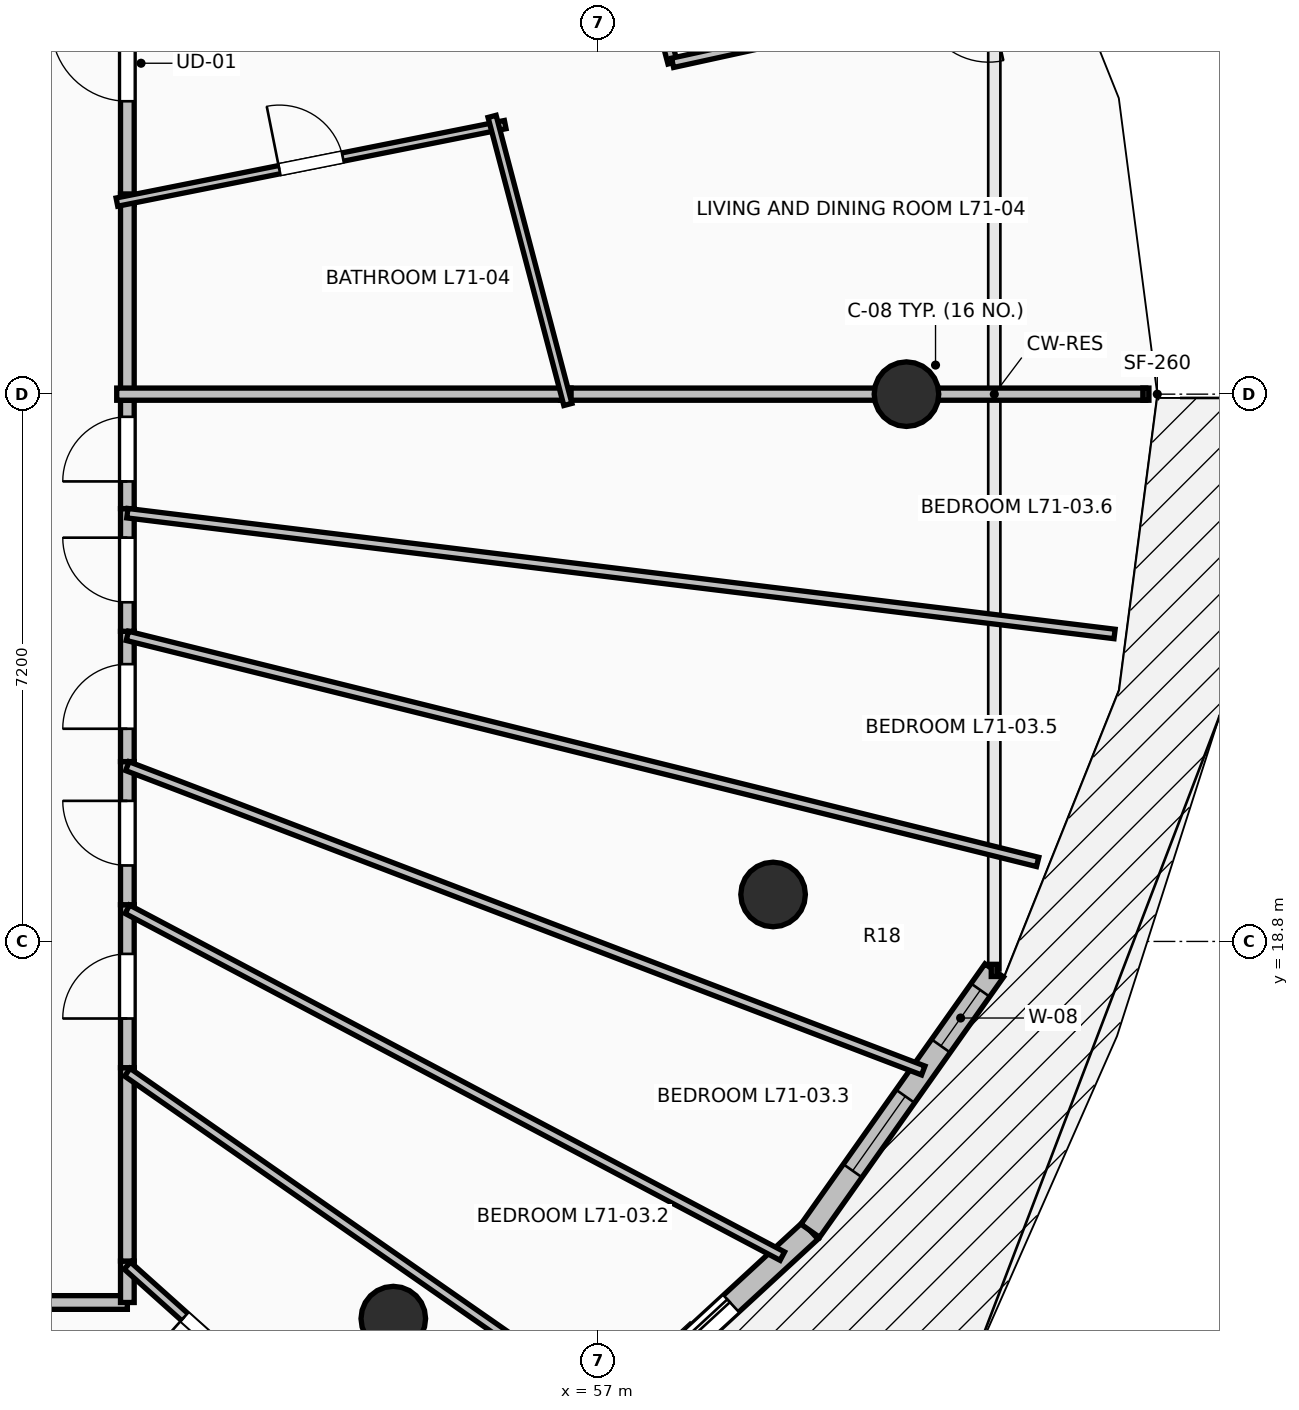
"""IFC4 building model, lengths in metres.
Left out: names, types, materials, properties, quantities, classifications, styles, units other than length and angle.
Written with IfcOpenShell. Run it as: python <this file> out.ifc"""

import sys

from ifc_helpers import new_model, si_unit, direction, frame, frame_2d, origin, origin_2d, place, context, subcontext, project, spatial, rectangle, circle, extrude, element, fill, save


model = new_model("IFC4")
c1 = context("Model", 3, precision=1e-05, world=origin(), true_north=direction((0.0, 1.0)))
c2 = subcontext(c1, "Body", "Model", "MODEL_VIEW")
j1 = project(units=[si_unit("LENGTHUNIT", "METRE"), si_unit("PLANEANGLEUNIT", "RADIAN")], contexts=[c1])
p1 = place(None, origin())
s1 = spatial("IfcSite", under=j1, at=p1, CompositionType="ELEMENT")
p2 = place(p1, origin())
s2 = spatial("IfcBuilding", under=s1, at=p2, CompositionType="ELEMENT")
p3 = place(p2, frame((0.0, 0.0, 262.65)))
s3 = spatial("IfcBuildingStorey", under=s2, at=p3, CompositionType="ELEMENT", Elevation=262.65)
for number, where, z_axis, x_axis in (
    (1, (61.05, 26.0, 0.0), (0.0, 0.0, 1.0), (1.0, 0.0, 0.0)),
    (2, (54.299, 13.838, 0.0), (0.0, 0.0, 1.0), (0.707, -0.707, 0.0)),
    (3, (59.295, 19.418, 0.0), (0.0, 0.0, 1.0), (0.924, -0.383, 0.0)),
):
    element("IfcColumn", number, at=place(p3, frame(where, z_axis=z_axis, x_axis=x_axis)), inside=s3, PredefinedType="COLUMN", context=c2, shape_type="SweptSolid", body=[
        extrude(circle(Radius=0.425, at=origin_2d()), origin(), (0.0, 0.0, 1.0), 3.55),
    ])
p4 = place(p3, frame((56.526, 11.992, 0.0), z_axis=(0.0, 0.0, 1.0), x_axis=(0.735445373611, 0.677584018727, 0.0)))
e4 = element("IfcWall", 4, at=p4, inside=s3, PredefinedType="STANDARD", context=c2, shape_type="SweptSolid", body=[
    extrude(rectangle(XDim=4.43, YDim=0.3, at=frame_2d((2.215, 0.0))), origin(), (0.0, 0.0, 1.0), 3.29),
])
p5 = place(p4, frame((1.415, 0.0, 0.0)))
e5 = element("IfcOpeningElement", 5, at=p5, cuts=e4, PredefinedType="OPENING", context=c2, shape_type="SweptSolid", body=[
    extrude(rectangle(XDim=1.6, YDim=2.3, at=frame_2d((0.8, 1.15))), frame((0.0, 0.165, 0.0), z_axis=(0.0, -1.0, 0.0), x_axis=(1.0, 0.0, 0.0)), (0.0, 0.0, 1.0), 0.33),
])
p6 = place(p3, frame((59.784, 14.994, 0.0), z_axis=(0.0, 0.0, 1.0), x_axis=(0.577261247247, 0.816559521668, 0.0)))
e6 = element("IfcWall", 6, at=p6, inside=s3, PredefinedType="STANDARD", context=c2, shape_type="SweptSolid", body=[
    extrude(rectangle(XDim=4.194, YDim=0.3, at=frame_2d((2.097, 0.0))), origin(), (0.0, 0.0, 1.0), 3.29),
])
p7 = place(p6, frame((0.966, 0.0, 0.85)))
e7 = element("IfcOpeningElement", 7, at=p7, cuts=e6, PredefinedType="OPENING", context=c2, shape_type="SweptSolid", body=[
    extrude(rectangle(XDim=1.2, YDim=1.95, at=frame_2d((0.6, 0.975))), frame((0.0, 0.165, 0.0), z_axis=(0.0, -1.0, 0.0), x_axis=(1.0, 0.0, 0.0)), (0.0, 0.0, 1.0), 0.33),
])
p8 = place(p6, frame((2.977, 0.0, 0.85)))
e8 = element("IfcOpeningElement", 8, at=p8, cuts=e6, PredefinedType="OPENING", context=c2, shape_type="SweptSolid", body=[
    extrude(rectangle(XDim=0.9, YDim=1.8, at=frame_2d((0.45, 0.9))), frame((0.0, 0.165, 0.0), z_axis=(0.0, -1.0, 0.0), x_axis=(1.0, 0.0, 0.0)), (0.0, 0.0, 1.0), 0.33),
])
p9 = place(p3, frame((45.936, 14.05, 0.0), z_axis=(0.0, 0.0, 1.0), x_axis=(1.0, 0.0, 0.0)))
e9 = element("IfcWall", 9, at=p9, inside=s3, PredefinedType="PARTITIONING", context=c2, shape_type="SweptSolid", body=[
    extrude(rectangle(XDim=4.864, YDim=0.18, at=frame_2d((2.432, 0.0))), origin(), (0.0, 0.0, 1.0), 2.482),
])
p10 = place(p9, frame((1.932, 0.0, 0.0)))
e10 = element("IfcOpeningElement", 10, at=p10, cuts=e9, PredefinedType="OPENING", context=c2, shape_type="SweptSolid", body=[
    extrude(rectangle(XDim=1.0, YDim=2.15, at=frame_2d((0.5, 1.075))), frame((0.0, 0.105, 0.0), z_axis=(0.0, -1.0, 0.0), x_axis=(1.0, 0.0, 0.0)), (0.0, 0.0, 1.0), 0.21),
])
p11 = place(p3, frame((50.8, 14.05, 0.0), z_axis=(0.0, 0.0, 1.0), x_axis=(0.0, 1.0, 0.0)))
e11 = element("IfcWall", 11, at=p11, inside=s3, PredefinedType="PARTITIONING", context=c2, shape_type="SweptSolid", body=[
    extrude(rectangle(XDim=0.545, YDim=0.18, at=frame_2d((0.272, 0.0))), origin(), (0.0, 0.0, 1.0), 3.022),
])
p12 = place(p3, frame((50.8, 14.595, 0.0), z_axis=(0.0, 0.0, 1.0), x_axis=(0.0, 1.0, 0.0)))
e12 = element("IfcWall", 12, at=p12, inside=s3, PredefinedType="PARTITIONING", context=c2, shape_type="SweptSolid", body=[
    extrude(rectangle(XDim=2.544, YDim=0.18, at=frame_2d((1.272, 0.0))), origin(), (0.0, 0.0, 1.0), 2.482),
])
p13 = place(p3, frame((50.8, 17.139, 0.0), z_axis=(0.0, 0.0, 1.0), x_axis=(0.0, 1.0, 0.0)))
e13 = element("IfcWall", 13, at=p13, inside=s3, PredefinedType="PARTITIONING", context=c2, shape_type="SweptSolid", body=[
    extrude(rectangle(XDim=2.144, YDim=0.18, at=frame_2d((1.072, 0.0))), origin(), (0.0, 0.0, 1.0), 3.29),
])
p14 = place(p13, frame((0.647, 0.0, 0.0)))
e14 = element("IfcOpeningElement", 14, at=p14, cuts=e13, PredefinedType="OPENING", context=c2, shape_type="SweptSolid", body=[
    extrude(rectangle(XDim=0.85, YDim=2.1, at=frame_2d((0.425, 1.05))), frame((0.0, 0.105, 0.0), z_axis=(0.0, -1.0, 0.0), x_axis=(1.0, 0.0, 0.0)), (0.0, 0.0, 1.0), 0.21),
])
p15 = place(p3, frame((50.8, 19.283, 0.0), z_axis=(0.0, 0.0, 1.0), x_axis=(0.0, 1.0, 0.0)))
e15 = element("IfcWall", 15, at=p15, inside=s3, PredefinedType="PARTITIONING", context=c2, shape_type="SweptSolid", body=[
    extrude(rectangle(XDim=1.883, YDim=0.18, at=frame_2d((0.941, 0.0))), origin(), (0.0, 0.0, 1.0), 3.29),
])
p16 = place(p15, frame((0.517, 0.0, 0.0)))
e16 = element("IfcOpeningElement", 16, at=p16, cuts=e15, PredefinedType="OPENING", context=c2, shape_type="SweptSolid", body=[
    extrude(rectangle(XDim=0.85, YDim=2.1, at=frame_2d((0.425, 1.05))), frame((0.0, 0.105, 0.0), z_axis=(0.0, -1.0, 0.0), x_axis=(1.0, 0.0, 0.0)), (0.0, 0.0, 1.0), 0.21),
])
p17 = place(p3, frame((50.8, 21.166, 0.0), z_axis=(0.0, 0.0, 1.0), x_axis=(0.0, 1.0, 0.0)))
e17 = element("IfcWall", 17, at=p17, inside=s3, PredefinedType="PARTITIONING", context=c2, shape_type="SweptSolid", body=[
    extrude(rectangle(XDim=1.714, YDim=0.18, at=frame_2d((0.857, 0.0))), origin(), (0.0, 0.0, 1.0), 3.29),
])
p18 = place(p17, frame((0.432, 0.0, 0.0)))
e18 = element("IfcOpeningElement", 18, at=p18, cuts=e17, PredefinedType="OPENING", context=c2, shape_type="SweptSolid", body=[
    extrude(rectangle(XDim=0.85, YDim=2.1, at=frame_2d((0.425, 1.05))), frame((0.0, 0.105, 0.0), z_axis=(0.0, -1.0, 0.0), x_axis=(1.0, 0.0, 0.0)), (0.0, 0.0, 1.0), 0.21),
])
p19 = place(p3, frame((50.8, 22.88, 0.0), z_axis=(0.0, 0.0, 1.0), x_axis=(0.0, 1.0, 0.0)))
e19 = element("IfcWall", 19, at=p19, inside=s3, PredefinedType="PARTITIONING", context=c2, shape_type="SweptSolid", body=[
    extrude(rectangle(XDim=1.614, YDim=0.18, at=frame_2d((0.807, 0.0))), origin(), (0.0, 0.0, 1.0), 3.29),
])
p20 = place(p19, frame((0.382, 0.0, 0.0)))
e20 = element("IfcOpeningElement", 20, at=p20, cuts=e19, PredefinedType="OPENING", context=c2, shape_type="SweptSolid", body=[
    extrude(rectangle(XDim=0.85, YDim=2.1, at=frame_2d((0.425, 1.05))), frame((0.0, 0.105, 0.0), z_axis=(0.0, -1.0, 0.0), x_axis=(1.0, 0.0, 0.0)), (0.0, 0.0, 1.0), 0.21),
])
p21 = place(p3, frame((50.8, 24.494, 0.0), z_axis=(0.0, 0.0, 1.0), x_axis=(0.0, 1.0, 0.0)))
e21 = element("IfcWall", 21, at=p21, inside=s3, PredefinedType="PARTITIONING", context=c2, shape_type="SweptSolid", body=[
    extrude(rectangle(XDim=1.566, YDim=0.18, at=frame_2d((0.783, 0.0))), origin(), (0.0, 0.0, 1.0), 3.29),
])
p22 = place(p21, frame((0.358, 0.0, 0.0)))
e22 = element("IfcOpeningElement", 22, at=p22, cuts=e21, PredefinedType="OPENING", context=c2, shape_type="SweptSolid", body=[
    extrude(rectangle(XDim=0.85, YDim=2.1, at=frame_2d((0.425, 1.05))), frame((0.0, 0.105, 0.0), z_axis=(0.0, -1.0, 0.0), x_axis=(1.0, 0.0, 0.0)), (0.0, 0.0, 1.0), 0.21),
])
p23 = place(p3, frame((50.8, 28.494, 0.0), z_axis=(0.0, 0.0, 1.0), x_axis=(0.0, 1.0, 0.0)))
e23 = element("IfcWall", 23, at=p23, inside=s3, PredefinedType="PARTITIONING", context=c2, shape_type="SweptSolid", body=[
    extrude(rectangle(XDim=3.719, YDim=0.18, at=frame_2d((1.859, 0.0))), origin(), (0.0, 0.0, 1.0), 3.29),
])
p24 = place(p23, frame((1.36, 0.0, 0.0)))
e24 = element("IfcOpeningElement", 24, at=p24, cuts=e23, PredefinedType="OPENING", context=c2, shape_type="SweptSolid", body=[
    extrude(rectangle(XDim=1.0, YDim=2.15, at=frame_2d((0.5, 1.075))), frame((0.0, 0.105, 0.0), z_axis=(0.0, -1.0, 0.0), x_axis=(1.0, 0.0, 0.0)), (0.0, 0.0, 1.0), 0.21),
])
p25 = place(p3, frame((50.8, 25.92, 0.0), z_axis=(0.0, 0.0, 1.0), x_axis=(0.0, 1.0, 0.0)))
e25 = element("IfcWall", 25, at=p25, inside=s3, PredefinedType="PARTITIONING", context=c2, shape_type="SweptSolid", body=[
    extrude(rectangle(XDim=2.714, YDim=0.18, at=frame_2d((1.357, 0.0))), origin(), (0.0, 0.0, 1.0), 2.482),
])
p26 = place(p3, frame((52.974, 12.588, 0.0), z_axis=(0.0, 0.0, 1.0), x_axis=(-0.744943619707, 0.667127426702, 0.0)))
e26 = element("IfcWall", 26, at=p26, inside=s3, PredefinedType="PARTITIONING", context=c2, shape_type="SweptSolid", body=[
    extrude(rectangle(XDim=2.918, YDim=0.125, at=frame_2d((1.459, 0.0))), origin(), (0.0, 0.0, 1.0), 2.874),
])
p27 = place(p26, frame((1.009, 0.0, 0.0)))
e27 = element("IfcOpeningElement", 27, at=p27, cuts=e26, PredefinedType="OPENING", context=c2, shape_type="SweptSolid", body=[
    extrude(rectangle(XDim=0.9, YDim=2.1, at=frame_2d((0.45, 1.05))), frame((0.0, 0.077, 0.0), z_axis=(0.0, -1.0, 0.0), x_axis=(1.0, 0.0, 0.0)), (0.0, 0.0, 1.0), 0.155),
])
p28 = place(p3, frame((57.203, 12.617, 0.0), z_axis=(0.0, 0.0, 1.0), x_axis=(-0.820423513177, 0.571756293386, 0.0)))
e28 = element("IfcWall", 28, at=p28, inside=s3, PredefinedType="PARTITIONING", context=c2, shape_type="SweptSolid", body=[
    extrude(rectangle(XDim=7.804, YDim=0.125, at=frame_2d((3.902, 0.0))), origin(), (0.0, 0.0, 1.0), 2.874),
])
p29 = place(p3, frame((59.417, 14.66, 0.0), z_axis=(0.0, 0.0, 1.0), x_axis=(-0.883742233358, 0.467974000325, 0.0)))
e29 = element("IfcWall", 29, at=p29, inside=s3, PredefinedType="PARTITIONING", context=c2, shape_type="SweptSolid", body=[
    extrude(rectangle(XDim=9.75, YDim=0.125, at=frame_2d((4.875, 0.0))), origin(), (0.0, 0.0, 1.0), 2.874),
])
p30 = place(p3, frame((61.271, 17.102, 0.0), z_axis=(0.0, 0.0, 1.0), x_axis=(-0.934042646632, 0.357161496066, 0.0)))
e30 = element("IfcWall", 30, at=p30, inside=s3, PredefinedType="PARTITIONING", context=c2, shape_type="SweptSolid", body=[
    extrude(rectangle(XDim=11.21, YDim=0.125, at=frame_2d((5.605, 0.0))), origin(), (0.0, 0.0, 1.0), 2.874),
])
p31 = place(p3, frame((62.776, 19.846, 0.0), z_axis=(0.0, 0.0, 1.0), x_axis=(-0.970519565335, 0.241022350211, 0.0)))
e31 = element("IfcWall", 31, at=p31, inside=s3, PredefinedType="PARTITIONING", context=c2, shape_type="SweptSolid", body=[
    extrude(rectangle(XDim=12.34, YDim=0.125, at=frame_2d((6.17, 0.0))), origin(), (0.0, 0.0, 1.0), 2.482),
])
p32 = place(p3, frame((63.788, 22.845, 0.0), z_axis=(0.0, 0.0, 1.0), x_axis=(-0.992598006299, 0.121446275738, 0.0)))
e32 = element("IfcWall", 32, at=p32, inside=s3, PredefinedType="PARTITIONING", context=c2, shape_type="SweptSolid", body=[
    extrude(rectangle(XDim=13.085, YDim=0.125, at=frame_2d((6.542, 0.0))), origin(), (0.0, 0.0, 1.0), 2.482),
])
p33 = place(p3, frame((64.199, 26.0, 0.0), z_axis=(0.0, 0.0, 1.0), x_axis=(-1.0, 0.0, 0.0)))
e33 = element("IfcWall", 33, at=p33, inside=s3, PredefinedType="PARTITIONING", context=c2, shape_type="SweptSolid", body=[
    extrude(rectangle(XDim=7.701, YDim=0.16, at=frame_2d((3.851, 0.0))), origin(), (0.0, 0.0, 1.0), 2.482),
])
p34 = place(p3, frame((56.638, 26.0, 0.0), z_axis=(0.0, 0.0, 1.0), x_axis=(-1.0, 0.0, 0.0)))
e34 = element("IfcWall", 34, at=p34, inside=s3, PredefinedType="PARTITIONING", context=c2, shape_type="SweptSolid", body=[
    extrude(rectangle(XDim=5.978, YDim=0.16, at=frame_2d((2.989, 0.0))), origin(), (0.0, 0.0, 1.0), 2.482),
])
p35 = place(p3, frame((50.663, 28.527, 0.0), z_axis=(0.0, 0.0, 1.0), x_axis=(0.980652709614, 0.195755620935, 0.0)))
e35 = element("IfcWall", 35, at=p35, inside=s3, PredefinedType="PARTITIONING", context=c2, shape_type="SweptSolid", body=[
    extrude(rectangle(XDim=5.209, YDim=0.11, at=frame_2d((2.605, 0.0))), origin(), (0.0, 0.0, 1.0), 2.936),
])
p36 = place(p35, frame((2.18, 0.0, 0.0)))
e36 = element("IfcOpeningElement", 36, at=p36, cuts=e35, PredefinedType="OPENING", context=c2, shape_type="SweptSolid", body=[
    extrude(rectangle(XDim=0.85, YDim=2.1, at=frame_2d((0.425, 1.05))), frame((0.0, 0.07, 0.0), z_axis=(0.0, -1.0, 0.0), x_axis=(1.0, 0.0, 0.0)), (0.0, 0.0, 1.0), 0.14),
])
p37 = place(p3, frame((55.598, 29.654, 0.0), z_axis=(0.0, 0.0, 1.0), x_axis=(0.25449329928, -0.967074537263, 0.0)))
e37 = element("IfcWall", 37, at=p37, inside=s3, PredefinedType="PARTITIONING", context=c2, shape_type="SweptSolid", body=[
    extrude(rectangle(XDim=3.919, YDim=0.11, at=frame_2d((1.959, 0.0))), origin(), (0.0, 0.0, 1.0), 2.482),
])
p38 = place(p3, frame((57.973, 30.359, 0.0), z_axis=(0.0, 0.0, 1.0), x_axis=(-0.254274526126, 0.967132082687, 0.0)))
e38 = element("IfcWall", 38, at=p38, inside=s3, PredefinedType="PARTITIONING", context=c2, shape_type="SweptSolid", body=[
    extrude(rectangle(XDim=1.813, YDim=0.125, at=frame_2d((0.906, 0.0))), origin(), (0.0, 0.0, 1.0), 3.29),
])
p39 = place(p3, frame((60.198, 30.845, 0.0), z_axis=(0.0, 0.0, 1.0), x_axis=(-0.976965000645, -0.213399595862, 0.0)))
e39 = element("IfcWall", 39, at=p39, inside=s3, PredefinedType="PARTITIONING", context=c2, shape_type="SweptSolid", body=[
    extrude(rectangle(XDim=2.278, YDim=0.125, at=frame_2d((1.139, 0.0))), origin(), (0.0, 0.0, 1.0), 2.874),
])
p40 = place(p5, origin())
e40 = element("IfcDoor", 40, at=p40, inside=s3, OperationType="SLIDING_TO_LEFT", PredefinedType="DOOR", context=c2, shape_type="SweptSolid", body=[
    extrude(rectangle(XDim=1.6, YDim=2.3, at=frame_2d((0.8, 1.15))), frame((0.0, 0.025, 0.0), z_axis=(0.0, -1.0, 0.0), x_axis=(1.0, 0.0, 0.0)), (0.0, 0.0, 1.0), 0.05),
])
fill(e5, e40)
p41 = place(p7, origin())
e41 = element("IfcWindow", 41, at=p41, inside=s3, PartitioningType="SINGLE_PANEL", PredefinedType="WINDOW", context=c2, shape_type="SweptSolid", body=[
    extrude(rectangle(XDim=1.2, YDim=1.95, at=frame_2d((0.6, 0.975))), frame((0.0, 0.03, 0.0), z_axis=(0.0, -1.0, 0.0), x_axis=(1.0, 0.0, 0.0)), (0.0, 0.0, 1.0), 0.06),
])
fill(e7, e41)
p42 = place(p8, origin())
e42 = element("IfcWindow", 42, at=p42, inside=s3, PartitioningType="SINGLE_PANEL", PredefinedType="WINDOW", context=c2, shape_type="SweptSolid", body=[
    extrude(rectangle(XDim=0.9, YDim=1.8, at=frame_2d((0.45, 0.9))), frame((0.0, 0.03, 0.0), z_axis=(0.0, -1.0, 0.0), x_axis=(1.0, 0.0, 0.0)), (0.0, 0.0, 1.0), 0.06),
])
fill(e8, e42)
p43 = place(p24, origin())
e43 = element("IfcDoor", 43, at=p43, inside=s3, OperationType="SINGLE_SWING_RIGHT", PredefinedType="DOOR", context=c2, shape_type="SweptSolid", body=[
    extrude(rectangle(XDim=1.0, YDim=2.15, at=frame_2d((0.5, 1.075))), frame((0.0, 0.025, 0.0), z_axis=(0.0, -1.0, 0.0), x_axis=(1.0, 0.0, 0.0)), (0.0, 0.0, 1.0), 0.05),
])
fill(e24, e43)
p44 = place(p27, origin())
e44 = element("IfcDoor", 44, at=p44, inside=s3, OperationType="SINGLE_SWING_RIGHT", PredefinedType="DOOR", context=c2, shape_type="SweptSolid", body=[
    extrude(rectangle(XDim=0.9, YDim=2.1, at=frame_2d((0.45, 1.05))), frame((0.0, 0.025, 0.0), z_axis=(0.0, -1.0, 0.0), x_axis=(1.0, 0.0, 0.0)), (0.0, 0.0, 1.0), 0.05),
])
fill(e27, e44)
p45 = place(p36, origin())
e45 = element("IfcDoor", 45, at=p45, inside=s3, OperationType="SINGLE_SWING_LEFT", PredefinedType="DOOR", context=c2, shape_type="SweptSolid", body=[
    extrude(rectangle(XDim=0.85, YDim=2.1, at=frame_2d((0.425, 1.05))), frame((0.0, 0.025, 0.0), z_axis=(0.0, -1.0, 0.0), x_axis=(1.0, 0.0, 0.0)), (0.0, 0.0, 1.0), 0.05),
])
fill(e36, e45)
p46 = place(p14, origin())
e46 = element("IfcDoor", 46, at=p46, inside=s3, OperationType="SINGLE_SWING_LEFT", PredefinedType="DOOR", context=c2, shape_type="SweptSolid", body=[
    extrude(rectangle(XDim=0.85, YDim=2.1, at=frame_2d((0.425, 1.05))), frame((0.0, 0.025, 0.0), z_axis=(0.0, -1.0, 0.0), x_axis=(1.0, 0.0, 0.0)), (0.0, 0.0, 1.0), 0.05),
])
fill(e14, e46)
p47 = place(p16, origin())
e47 = element("IfcDoor", 47, at=p47, inside=s3, OperationType="SINGLE_SWING_RIGHT", PredefinedType="DOOR", context=c2, shape_type="SweptSolid", body=[
    extrude(rectangle(XDim=0.85, YDim=2.1, at=frame_2d((0.425, 1.05))), frame((0.0, 0.025, 0.0), z_axis=(0.0, -1.0, 0.0), x_axis=(1.0, 0.0, 0.0)), (0.0, 0.0, 1.0), 0.05),
])
fill(e16, e47)
p48 = place(p18, origin())
e48 = element("IfcDoor", 48, at=p48, inside=s3, OperationType="SINGLE_SWING_LEFT", PredefinedType="DOOR", context=c2, shape_type="SweptSolid", body=[
    extrude(rectangle(XDim=0.85, YDim=2.1, at=frame_2d((0.425, 1.05))), frame((0.0, 0.025, 0.0), z_axis=(0.0, -1.0, 0.0), x_axis=(1.0, 0.0, 0.0)), (0.0, 0.0, 1.0), 0.05),
])
fill(e18, e48)
p49 = place(p20, origin())
e49 = element("IfcDoor", 49, at=p49, inside=s3, OperationType="SINGLE_SWING_RIGHT", PredefinedType="DOOR", context=c2, shape_type="SweptSolid", body=[
    extrude(rectangle(XDim=0.85, YDim=2.1, at=frame_2d((0.425, 1.05))), frame((0.0, 0.025, 0.0), z_axis=(0.0, -1.0, 0.0), x_axis=(1.0, 0.0, 0.0)), (0.0, 0.0, 1.0), 0.05),
])
fill(e20, e49)
p50 = place(p22, origin())
e50 = element("IfcDoor", 50, at=p50, inside=s3, OperationType="SINGLE_SWING_LEFT", PredefinedType="DOOR", context=c2, shape_type="SweptSolid", body=[
    extrude(rectangle(XDim=0.85, YDim=2.1, at=frame_2d((0.425, 1.05))), frame((0.0, 0.025, 0.0), z_axis=(0.0, -1.0, 0.0), x_axis=(1.0, 0.0, 0.0)), (0.0, 0.0, 1.0), 0.05),
])
fill(e22, e50)
save(model, sys.argv[1])
